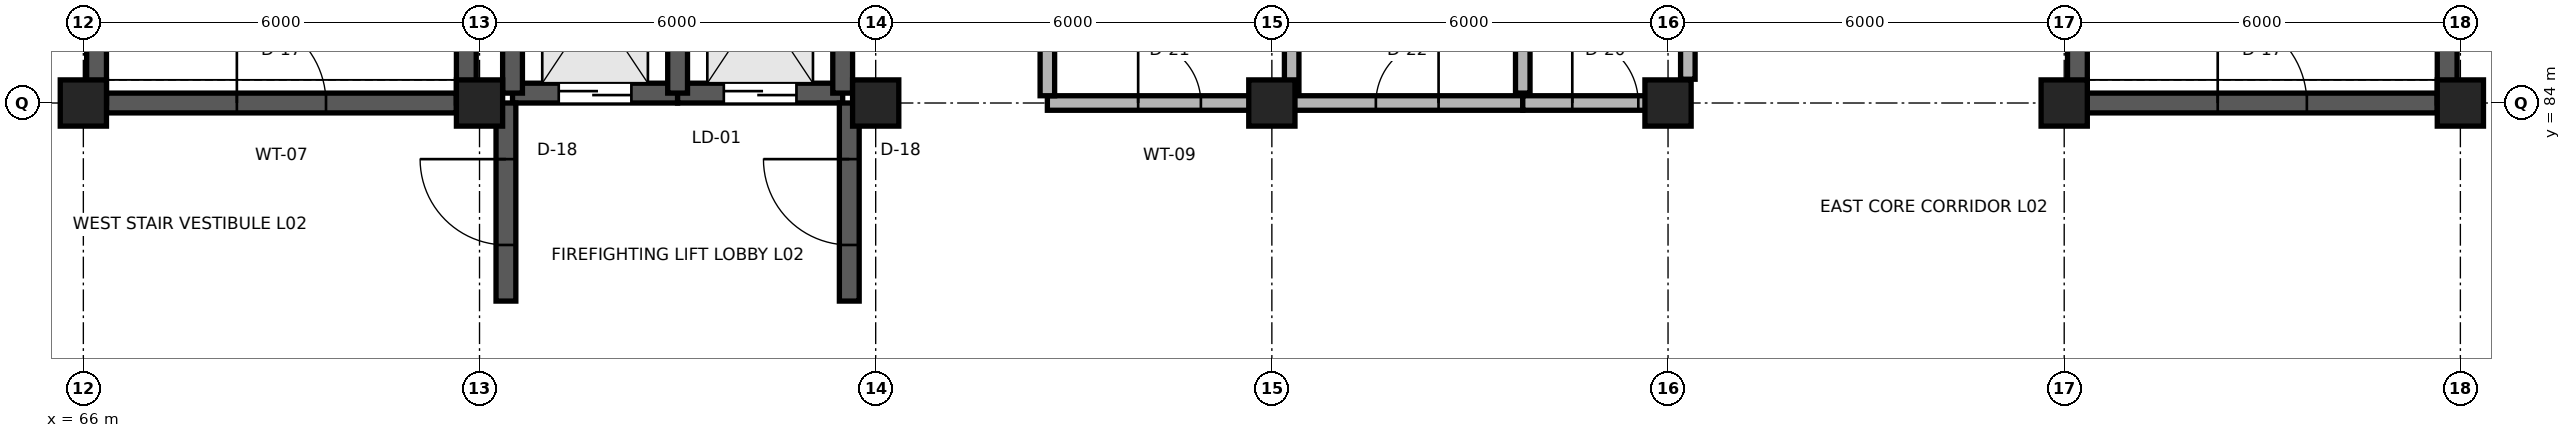
"""IFC4 building model, lengths in metres.
Left out: names, types, materials, properties, quantities, classifications, styles, units other than length and angle.
Written with IfcOpenShell. Run it as: python <this file> out.ifc"""

import sys

from ifc_helpers import new_model, si_unit, direction, frame, frame_2d, origin, origin_2d, place, context, subcontext, project, spatial, rectangle, extrude, element, fill, save


model = new_model("IFC4")
c1 = context("Model", 3, precision=1e-05, world=origin(), true_north=direction((0.0, 1.0)))
c2 = subcontext(c1, "Body", "Model", "MODEL_VIEW")
j1 = project(units=[si_unit("LENGTHUNIT", "METRE"), si_unit("PLANEANGLEUNIT", "RADIAN")], contexts=[c1])
p1 = place(None, origin())
s1 = spatial("IfcSite", under=j1, at=p1, CompositionType="ELEMENT")
p2 = place(p1, origin())
s2 = spatial("IfcBuilding", under=s1, at=p2, CompositionType="ELEMENT")
p3 = place(p2, frame((0.0, 0.0, 6.0)))
s3 = spatial("IfcBuildingStorey", under=s2, at=p3, CompositionType="ELEMENT", Elevation=6.0)
for number, where, z_axis, x_axis in (
    (1, (66.0, 84.0, 0.0), (0.0, 0.0, 1.0), (1.0, 0.0, 0.0)),
    (2, (72.0, 84.0, 0.0), (0.0, 0.0, 1.0), (1.0, 0.0, 0.0)),
    (3, (78.0, 84.0, 0.0), (0.0, 0.0, 1.0), (1.0, 0.0, 0.0)),
    (4, (84.0, 84.0, 0.0), (0.0, 0.0, 1.0), (1.0, 0.0, 0.0)),
    (5, (90.0, 84.0, 0.0), (0.0, 0.0, 1.0), (1.0, 0.0, 0.0)),
    (6, (96.0, 84.0, 0.0), (0.0, 0.0, 1.0), (1.0, 0.0, 0.0)),
    (7, (102.0, 84.0, 0.0), (0.0, 0.0, 1.0), (1.0, 0.0, 0.0)),
):
    element("IfcColumn", number, at=place(p3, frame(where, z_axis=z_axis, x_axis=x_axis)), inside=s3, PredefinedType="COLUMN", context=c2, shape_type="SweptSolid", body=[
        extrude(rectangle(XDim=0.7, YDim=0.7, at=origin_2d()), origin(), (0.0, 0.0, 1.0), 6.0),
    ])
p4 = place(p3, frame((66.35, 84.0, 0.0), z_axis=(0.0, 0.0, 1.0), x_axis=(1.0, 0.0, 0.0)))
e8 = element("IfcWall", 8, at=p4, inside=s3, PredefinedType="SHEAR", context=c2, shape_type="SweptSolid", body=[
    extrude(rectangle(XDim=5.3, YDim=0.3, at=frame_2d((2.65, 0.0))), origin(), (0.0, 0.0, 1.0), 5.76),
])
p5 = place(p4, frame((1.975, 0.0, 0.0)))
e9 = element("IfcOpeningElement", 9, at=p5, cuts=e8, PredefinedType="OPENING", context=c2, shape_type="SweptSolid", body=[
    extrude(rectangle(XDim=1.35, YDim=2.2, at=frame_2d((0.675, 1.1))), frame((0.0, 0.165, 0.0), z_axis=(0.0, -1.0, 0.0), x_axis=(1.0, 0.0, 0.0)), (0.0, 0.0, 1.0), 0.33),
])
for number, where, z_axis, x_axis in (
    (10, (66.2, 84.0, 0.0), (0.0, 0.0, 1.0), (0.0, 1.0, 0.0)),
    (11, (71.8, 84.0, 0.0), (0.0, 0.0, 1.0), (0.0, 1.0, 0.0)),
):
    element("IfcWall", number, at=place(p3, frame(where, z_axis=z_axis, x_axis=x_axis)), inside=s3, PredefinedType="SHEAR", context=c2, shape_type="SweptSolid", body=[
        extrude(rectangle(XDim=11.8, YDim=0.3, at=frame_2d((5.9, 0.0))), origin(), (0.0, 0.0, 1.0), 5.76),
    ])
p6 = place(p3, frame((96.35, 84.0, 0.0), z_axis=(0.0, 0.0, 1.0), x_axis=(1.0, 0.0, 0.0)))
e12 = element("IfcWall", 12, at=p6, inside=s3, PredefinedType="SHEAR", context=c2, shape_type="SweptSolid", body=[
    extrude(rectangle(XDim=5.3, YDim=0.3, at=frame_2d((2.65, 0.0))), origin(), (0.0, 0.0, 1.0), 5.76),
])
p7 = place(p6, frame((1.975, 0.0, 0.0)))
e13 = element("IfcOpeningElement", 13, at=p7, cuts=e12, PredefinedType="OPENING", context=c2, shape_type="SweptSolid", body=[
    extrude(rectangle(XDim=1.35, YDim=2.2, at=frame_2d((0.675, 1.1))), frame((0.0, 0.165, 0.0), z_axis=(0.0, -1.0, 0.0), x_axis=(1.0, 0.0, 0.0)), (0.0, 0.0, 1.0), 0.33),
])
for number, where, z_axis, x_axis in (
    (14, (96.2, 84.0, 0.0), (0.0, 0.0, 1.0), (0.0, 1.0, 0.0)),
    (15, (101.8, 84.0, 0.0), (0.0, 0.0, 1.0), (0.0, 1.0, 0.0)),
):
    element("IfcWall", number, at=place(p3, frame(where, z_axis=z_axis, x_axis=x_axis)), inside=s3, PredefinedType="SHEAR", context=c2, shape_type="SweptSolid", body=[
        extrude(rectangle(XDim=11.8, YDim=0.3, at=frame_2d((5.9, 0.0))), origin(), (0.0, 0.0, 1.0), 5.76),
    ])
p8 = place(p3, frame((72.5, 84.15, 0.0), z_axis=(0.0, 0.0, 1.0), x_axis=(1.0, 0.0, 0.0)))
e16 = element("IfcWall", 16, at=p8, inside=s3, PredefinedType="SHEAR", context=c2, shape_type="SweptSolid", body=[
    extrude(rectangle(XDim=2.5, YDim=0.3, at=frame_2d((1.25, 0.0))), origin(), (0.0, 0.0, 1.0), 5.76),
])
p9 = place(p8, frame((0.7, 0.0, 0.0)))
e17 = element("IfcOpeningElement", 17, at=p9, cuts=e16, PredefinedType="OPENING", context=c2, shape_type="SweptSolid", body=[
    extrude(rectangle(XDim=1.1, YDim=2.1, at=frame_2d((0.55, 1.05))), frame((0.0, 0.165, 0.0), z_axis=(0.0, -1.0, 0.0), x_axis=(1.0, 0.0, 0.0)), (0.0, 0.0, 1.0), 0.33),
])
p10 = place(p3, frame((72.5, 84.15, 0.0), z_axis=(0.0, 0.0, 1.0), x_axis=(0.0, 1.0, 0.0)))
e18 = element("IfcWall", 18, at=p10, inside=s3, PredefinedType="SHEAR", context=c2, shape_type="SweptSolid", body=[
    extrude(rectangle(XDim=3.4, YDim=0.3, at=frame_2d((1.7, 0.0))), origin(), (0.0, 0.0, 1.0), 5.76),
])
p11 = place(p3, frame((75.0, 84.15, 0.0), z_axis=(0.0, 0.0, 1.0), x_axis=(1.0, 0.0, 0.0)))
e19 = element("IfcWall", 19, at=p11, inside=s3, PredefinedType="SHEAR", context=c2, shape_type="SweptSolid", body=[
    extrude(rectangle(XDim=2.5, YDim=0.3, at=frame_2d((1.25, 0.0))), origin(), (0.0, 0.0, 1.0), 5.76),
])
p12 = place(p11, frame((0.7, 0.0, 0.0)))
e20 = element("IfcOpeningElement", 20, at=p12, cuts=e19, PredefinedType="OPENING", context=c2, shape_type="SweptSolid", body=[
    extrude(rectangle(XDim=1.1, YDim=2.1, at=frame_2d((0.55, 1.05))), frame((0.0, 0.165, 0.0), z_axis=(0.0, -1.0, 0.0), x_axis=(1.0, 0.0, 0.0)), (0.0, 0.0, 1.0), 0.33),
])
for number, where, z_axis, x_axis in (
    (21, (75.0, 84.15, 0.0), (0.0, 0.0, 1.0), (0.0, 1.0, 0.0)),
    (22, (77.5, 84.15, 0.0), (0.0, 0.0, 1.0), (0.0, 1.0, 0.0)),
):
    element("IfcWall", number, at=place(p3, frame(where, z_axis=z_axis, x_axis=x_axis)), inside=s3, PredefinedType="SHEAR", context=c2, shape_type="SweptSolid", body=[
        extrude(rectangle(XDim=3.4, YDim=0.3, at=frame_2d((1.7, 0.0))), origin(), (0.0, 0.0, 1.0), 5.76),
    ])
p13 = place(p3, frame((72.4, 81.0, 0.0), z_axis=(0.0, 0.0, 1.0), x_axis=(0.0, 1.0, 0.0)))
e23 = element("IfcWall", 23, at=p13, inside=s3, PredefinedType="SHEAR", context=c2, shape_type="SweptSolid", body=[
    extrude(rectangle(XDim=3.0, YDim=0.3, at=frame_2d((1.5, 0.0))), origin(), (0.0, 0.0, 1.0), 5.76),
])
p14 = place(p13, frame((0.85, 0.0, 0.0)))
e24 = element("IfcOpeningElement", 24, at=p14, cuts=e23, PredefinedType="OPENING", context=c2, shape_type="SweptSolid", body=[
    extrude(rectangle(XDim=1.3, YDim=2.2, at=frame_2d((0.65, 1.1))), frame((0.0, 0.165, 0.0), z_axis=(0.0, -1.0, 0.0), x_axis=(1.0, 0.0, 0.0)), (0.0, 0.0, 1.0), 0.33),
])
p15 = place(p3, frame((77.6, 81.0, 0.0), z_axis=(0.0, 0.0, 1.0), x_axis=(0.0, 1.0, 0.0)))
e25 = element("IfcWall", 25, at=p15, inside=s3, PredefinedType="SHEAR", context=c2, shape_type="SweptSolid", body=[
    extrude(rectangle(XDim=3.0, YDim=0.3, at=frame_2d((1.5, 0.0))), origin(), (0.0, 0.0, 1.0), 5.76),
])
p16 = place(p15, frame((0.85, 0.0, 0.0)))
e26 = element("IfcOpeningElement", 26, at=p16, cuts=e25, PredefinedType="OPENING", context=c2, shape_type="SweptSolid", body=[
    extrude(rectangle(XDim=1.3, YDim=2.2, at=frame_2d((0.65, 1.1))), frame((0.0, 0.165, 0.0), z_axis=(0.0, -1.0, 0.0), x_axis=(1.0, 0.0, 0.0)), (0.0, 0.0, 1.0), 0.33),
])
p17 = place(p3, frame((80.6, 84.0, 0.0), z_axis=(0.0, 0.0, 1.0), x_axis=(1.0, 0.0, 0.0)))
e27 = element("IfcWall", 27, at=p17, inside=s3, PredefinedType="PARTITIONING", context=c2, shape_type="SweptSolid", body=[
    extrude(rectangle(XDim=3.7, YDim=0.22, at=frame_2d((1.85, 0.0))), origin(), (0.0, 0.0, 1.0), 5.32),
])
p18 = place(p17, frame((1.375, 0.0, 0.0)))
e28 = element("IfcOpeningElement", 28, at=p18, cuts=e27, PredefinedType="OPENING", context=c2, shape_type="SweptSolid", body=[
    extrude(rectangle(XDim=0.95, YDim=2.15, at=frame_2d((0.475, 1.075))), frame((0.0, 0.125, 0.0), z_axis=(0.0, -1.0, 0.0), x_axis=(1.0, 0.0, 0.0)), (0.0, 0.0, 1.0), 0.25),
])
p19 = place(p3, frame((84.3, 84.0, 0.0), z_axis=(0.0, 0.0, 1.0), x_axis=(1.0, 0.0, 0.0)))
e29 = element("IfcWall", 29, at=p19, inside=s3, PredefinedType="PARTITIONING", context=c2, shape_type="SweptSolid", body=[
    extrude(rectangle(XDim=3.5, YDim=0.22, at=frame_2d((1.75, 0.0))), origin(), (0.0, 0.0, 1.0), 5.32),
])
p20 = place(p19, frame((1.275, 0.0, 0.0)))
e30 = element("IfcOpeningElement", 30, at=p20, cuts=e29, PredefinedType="OPENING", context=c2, shape_type="SweptSolid", body=[
    extrude(rectangle(XDim=0.95, YDim=2.1, at=frame_2d((0.475, 1.05))), frame((0.0, 0.125, 0.0), z_axis=(0.0, -1.0, 0.0), x_axis=(1.0, 0.0, 0.0)), (0.0, 0.0, 1.0), 0.25),
])
p21 = place(p3, frame((87.8, 84.0, 0.0), z_axis=(0.0, 0.0, 1.0), x_axis=(1.0, 0.0, 0.0)))
e31 = element("IfcWall", 31, at=p21, inside=s3, PredefinedType="PARTITIONING", context=c2, shape_type="SweptSolid", body=[
    extrude(rectangle(XDim=2.5, YDim=0.22, at=frame_2d((1.25, 0.0))), origin(), (0.0, 0.0, 1.0), 5.32),
])
p22 = place(p21, frame((0.75, 0.0, 0.0)))
e32 = element("IfcOpeningElement", 32, at=p22, cuts=e31, PredefinedType="OPENING", context=c2, shape_type="SweptSolid", body=[
    extrude(rectangle(XDim=1.0, YDim=2.15, at=frame_2d((0.5, 1.075))), frame((0.0, 0.125, 0.0), z_axis=(0.0, -1.0, 0.0), x_axis=(1.0, 0.0, 0.0)), (0.0, 0.0, 1.0), 0.25),
])
for number, where, z_axis, x_axis in (
    (33, (84.3, 84.15, 0.0), (0.0, 0.0, 1.0), (0.0, 1.0, 0.0)),
    (34, (87.8, 84.15, 0.0), (0.0, 0.0, 1.0), (0.0, 1.0, 0.0)),
):
    element("IfcWall", number, at=place(p3, frame(where, z_axis=z_axis, x_axis=x_axis)), inside=s3, PredefinedType="PARTITIONING", context=c2, shape_type="SweptSolid", body=[
        extrude(rectangle(XDim=5.0, YDim=0.22, at=frame_2d((2.5, 0.0))), origin(), (0.0, 0.0, 1.0), 5.76),
    ])
p23 = place(p3, frame((80.6, 84.11, 0.0), z_axis=(0.0, 0.0, 1.0), x_axis=(0.0, 1.0, 0.0)))
e35 = element("IfcWall", 35, at=p23, inside=s3, PredefinedType="PARTITIONING", context=c2, shape_type="SweptSolid", body=[
    extrude(rectangle(XDim=4.98, YDim=0.22, at=frame_2d((2.49, 0.0))), origin(), (0.0, 0.0, 1.0), 5.76),
])
p24 = place(p3, frame((90.3, 84.36, 0.0), z_axis=(0.0, 0.0, 1.0), x_axis=(0.0, 1.0, 0.0)))
e36 = element("IfcWall", 36, at=p24, inside=s3, PredefinedType="PARTITIONING", context=c2, shape_type="SweptSolid", body=[
    extrude(rectangle(XDim=4.73, YDim=0.22, at=frame_2d((2.365, 0.0))), origin(), (0.0, 0.0, 1.0), 5.76),
])
p25 = place(p5, origin())
e37 = element("IfcDoor", 37, at=p25, inside=s3, OperationType="SINGLE_SWING_LEFT", PredefinedType="DOOR", context=c2, shape_type="SweptSolid", body=[
    extrude(rectangle(XDim=1.35, YDim=2.2, at=frame_2d((0.675, 1.1))), frame((0.0, 0.025, 0.0), z_axis=(0.0, -1.0, 0.0), x_axis=(1.0, 0.0, 0.0)), (0.0, 0.0, 1.0), 0.05),
])
fill(e9, e37)
p26 = place(p7, origin())
e38 = element("IfcDoor", 38, at=p26, inside=s3, OperationType="SINGLE_SWING_LEFT", PredefinedType="DOOR", context=c2, shape_type="SweptSolid", body=[
    extrude(rectangle(XDim=1.35, YDim=2.2, at=frame_2d((0.675, 1.1))), frame((0.0, 0.025, 0.0), z_axis=(0.0, -1.0, 0.0), x_axis=(1.0, 0.0, 0.0)), (0.0, 0.0, 1.0), 0.05),
])
fill(e13, e38)
p27 = place(p9, origin())
e39 = element("IfcDoor", 39, at=p27, inside=s3, OperationType="DOUBLE_DOOR_SLIDING", PredefinedType="DOOR", context=c2, shape_type="SweptSolid", body=[
    extrude(rectangle(XDim=1.1, YDim=2.1, at=frame_2d((0.55, 1.05))), frame((0.0, 0.025, 0.0), z_axis=(0.0, -1.0, 0.0), x_axis=(1.0, 0.0, 0.0)), (0.0, 0.0, 1.0), 0.05),
])
fill(e17, e39)
p28 = place(p12, origin())
e40 = element("IfcDoor", 40, at=p28, inside=s3, OperationType="DOUBLE_DOOR_SLIDING", PredefinedType="DOOR", context=c2, shape_type="SweptSolid", body=[
    extrude(rectangle(XDim=1.1, YDim=2.1, at=frame_2d((0.55, 1.05))), frame((0.0, 0.025, 0.0), z_axis=(0.0, -1.0, 0.0), x_axis=(1.0, 0.0, 0.0)), (0.0, 0.0, 1.0), 0.05),
])
fill(e20, e40)
p29 = place(p14, origin())
e41 = element("IfcDoor", 41, at=p29, inside=s3, OperationType="SINGLE_SWING_RIGHT", PredefinedType="DOOR", context=c2, shape_type="SweptSolid", body=[
    extrude(rectangle(XDim=1.3, YDim=2.2, at=frame_2d((0.65, 1.1))), frame((0.0, 0.025, 0.0), z_axis=(0.0, -1.0, 0.0), x_axis=(1.0, 0.0, 0.0)), (0.0, 0.0, 1.0), 0.05),
])
fill(e24, e41)
p30 = place(p16, origin())
e42 = element("IfcDoor", 42, at=p30, inside=s3, OperationType="SINGLE_SWING_RIGHT", PredefinedType="DOOR", context=c2, shape_type="SweptSolid", body=[
    extrude(rectangle(XDim=1.3, YDim=2.2, at=frame_2d((0.65, 1.1))), frame((0.0, 0.025, 0.0), z_axis=(0.0, -1.0, 0.0), x_axis=(1.0, 0.0, 0.0)), (0.0, 0.0, 1.0), 0.05),
])
fill(e26, e42)
p31 = place(p18, origin())
e43 = element("IfcDoor", 43, at=p31, inside=s3, OperationType="SINGLE_SWING_LEFT", PredefinedType="DOOR", context=c2, shape_type="SweptSolid", body=[
    extrude(rectangle(XDim=0.95, YDim=2.15, at=frame_2d((0.475, 1.075))), frame((0.0, 0.025, 0.0), z_axis=(0.0, -1.0, 0.0), x_axis=(1.0, 0.0, 0.0)), (0.0, 0.0, 1.0), 0.05),
])
fill(e28, e43)
p32 = place(p20, origin())
e44 = element("IfcDoor", 44, at=p32, inside=s3, OperationType="SINGLE_SWING_RIGHT", PredefinedType="DOOR", context=c2, shape_type="SweptSolid", body=[
    extrude(rectangle(XDim=0.95, YDim=2.1, at=frame_2d((0.475, 1.05))), frame((0.0, 0.025, 0.0), z_axis=(0.0, -1.0, 0.0), x_axis=(1.0, 0.0, 0.0)), (0.0, 0.0, 1.0), 0.05),
])
fill(e30, e44)
p33 = place(p22, origin())
e45 = element("IfcDoor", 45, at=p33, inside=s3, OperationType="SINGLE_SWING_LEFT", PredefinedType="DOOR", context=c2, shape_type="SweptSolid", body=[
    extrude(rectangle(XDim=1.0, YDim=2.15, at=frame_2d((0.5, 1.075))), frame((0.0, 0.025, 0.0), z_axis=(0.0, -1.0, 0.0), x_axis=(1.0, 0.0, 0.0)), (0.0, 0.0, 1.0), 0.05),
])
fill(e32, e45)
save(model, sys.argv[1])
